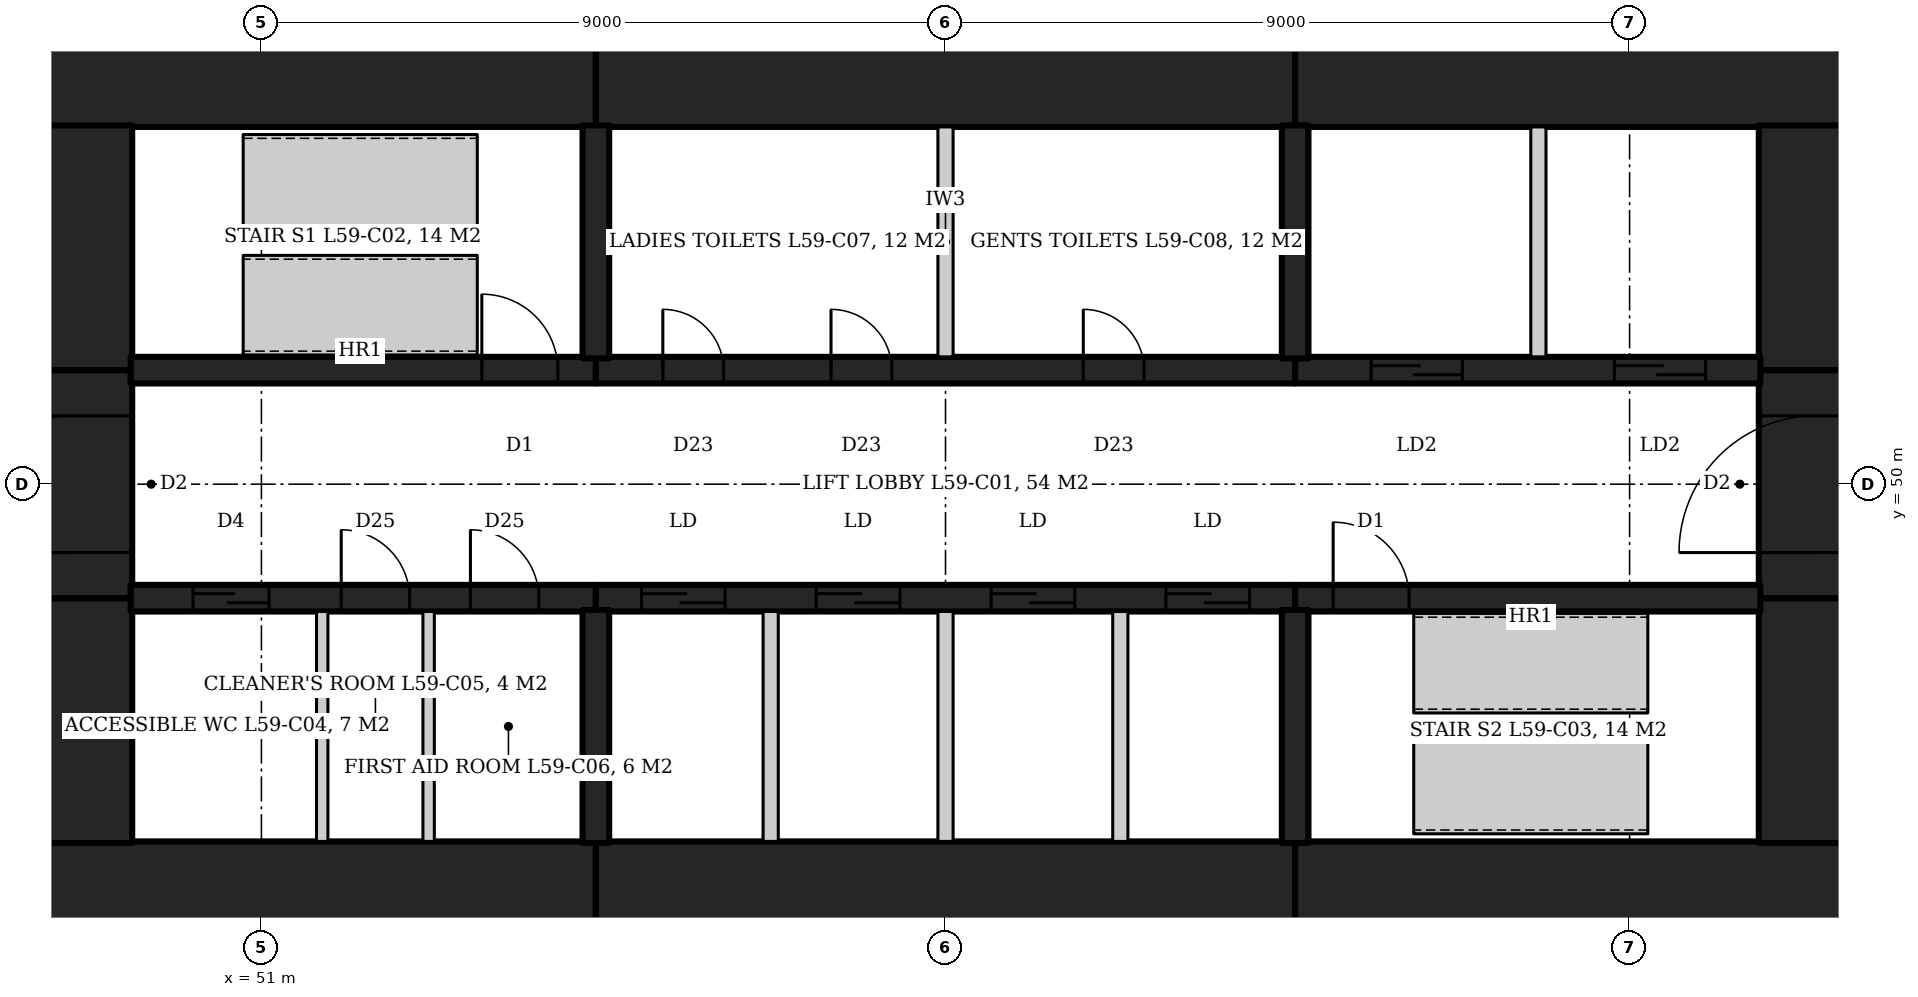
"""IFC4 building model, lengths in metres.
Left out: names, types, materials, properties, quantities, classifications, styles, units other than length and angle.
Written with IfcOpenShell. Run it as: python <this file> out.ifc"""

import sys

from ifc_helpers import new_model, si_unit, direction, frame, frame_2d, origin, place, context, subcontext, project, spatial, rectangle, extrude, element, fill, save


model = new_model("IFC4")
c1 = context("Model", 3, precision=1e-05, world=origin(), true_north=direction((0.0, 1.0)))
c2 = subcontext(c1, "Body", "Model", "MODEL_VIEW")
j1 = project(units=[si_unit("LENGTHUNIT", "METRE"), si_unit("PLANEANGLEUNIT", "RADIAN")], contexts=[c1])
p1 = place(None, origin())
s1 = spatial("IfcSite", under=j1, at=p1, CompositionType="ELEMENT")
p2 = place(p1, origin())
s2 = spatial("IfcBuilding", under=s1, at=p2, CompositionType="ELEMENT")
p3 = place(p2, frame((0.0, 0.0, 252.8)))
s3 = spatial("IfcBuildingStorey", under=s2, at=p3, CompositionType="ELEMENT", Elevation=252.8)
p4 = place(p3, frame((47.8, 55.45, 0.0), z_axis=(0.0, 0.0, 1.0), x_axis=(1.0, 0.0, 0.0)))
e1 = element("IfcWall", 1, at=p4, inside=s3, PredefinedType="SHEAR", context=c2, shape_type="SweptSolid", body=[
    extrude(rectangle(XDim=7.6, YDim=1.5, at=frame_2d((3.8, 0.0))), origin(), (0.0, 0.0, 1.0), 4.2),
])
p5 = place(p3, frame((55.4, 55.45, 0.0), z_axis=(0.0, 0.0, 1.0), x_axis=(1.0, 0.0, 0.0)))
e2 = element("IfcWall", 2, at=p5, inside=s3, PredefinedType="SHEAR", context=c2, shape_type="SweptSolid", body=[
    extrude(rectangle(XDim=9.2, YDim=1.5, at=frame_2d((4.6, 0.0))), origin(), (0.0, 0.0, 1.0), 4.2),
])
for number, where, z_axis, x_axis in (
    (3, (64.6, 55.45, 0.0), (0.0, 0.0, 1.0), (1.0, 0.0, 0.0)),
    (4, (47.8, 44.55, 0.0), (0.0, 0.0, 1.0), (1.0, 0.0, 0.0)),
):
    element("IfcWall", number, at=place(p3, frame(where, z_axis=z_axis, x_axis=x_axis)), inside=s3, PredefinedType="SHEAR", context=c2, shape_type="SweptSolid", body=[
        extrude(rectangle(XDim=7.6, YDim=1.5, at=frame_2d((3.8, 0.0))), origin(), (0.0, 0.0, 1.0), 4.2),
    ])
p6 = place(p3, frame((55.4, 44.55, 0.0), z_axis=(0.0, 0.0, 1.0), x_axis=(1.0, 0.0, 0.0)))
e5 = element("IfcWall", 5, at=p6, inside=s3, PredefinedType="SHEAR", context=c2, shape_type="SweptSolid", body=[
    extrude(rectangle(XDim=9.2, YDim=1.5, at=frame_2d((4.6, 0.0))), origin(), (0.0, 0.0, 1.0), 4.2),
])
p7 = place(p3, frame((64.6, 44.55, 0.0), z_axis=(0.0, 0.0, 1.0), x_axis=(1.0, 0.0, 0.0)))
e6 = element("IfcWall", 6, at=p7, inside=s3, PredefinedType="SHEAR", context=c2, shape_type="SweptSolid", body=[
    extrude(rectangle(XDim=7.6, YDim=1.5, at=frame_2d((3.8, 0.0))), origin(), (0.0, 0.0, 1.0), 4.2),
])
p8 = place(p3, frame((71.45, 45.28, 0.0), z_axis=(0.0, 0.0, 1.0), x_axis=(0.0, 1.0, 0.0)))
e7 = element("IfcWall", 7, at=p8, inside=s3, PredefinedType="SHEAR", context=c2, shape_type="SweptSolid", body=[
    extrude(rectangle(XDim=3.22, YDim=1.5, at=frame_2d((1.61, 0.0))), origin(), (0.0, 0.0, 1.0), 4.2),
])
p9 = place(p3, frame((71.45, 48.5, 0.0), z_axis=(0.0, 0.0, 1.0), x_axis=(0.0, 1.0, 0.0)))
e8 = element("IfcWall", 8, at=p9, inside=s3, PredefinedType="SHEAR", context=c2, shape_type="SweptSolid", body=[
    extrude(rectangle(XDim=3.0, YDim=1.5, at=frame_2d((1.5, 0.0))), origin(), (0.0, 0.0, 1.0), 4.2),
])
p10 = place(p9, frame((0.6, 0.0, 0.0)))
e9 = element("IfcOpeningElement", 9, at=p10, cuts=e8, PredefinedType="OPENING", context=c2, shape_type="SweptSolid", body=[
    extrude(rectangle(XDim=1.8, YDim=2.1, at=frame_2d((0.9, 1.05))), frame((0.0, 0.76, 0.0), z_axis=(0.0, -1.0, 0.0), x_axis=(1.0, 0.0, 0.0)), (0.0, 0.0, 1.0), 1.52),
])
for number, where, z_axis, x_axis in (
    (10, (71.45, 51.5, 0.0), (0.0, 0.0, 1.0), (0.0, 1.0, 0.0)),
    (11, (48.55, 45.28, 0.0), (0.0, 0.0, 1.0), (0.0, 1.0, 0.0)),
):
    element("IfcWall", number, at=place(p3, frame(where, z_axis=z_axis, x_axis=x_axis)), inside=s3, PredefinedType="SHEAR", context=c2, shape_type="SweptSolid", body=[
        extrude(rectangle(XDim=3.22, YDim=1.5, at=frame_2d((1.61, 0.0))), origin(), (0.0, 0.0, 1.0), 4.2),
    ])
p11 = place(p3, frame((48.55, 48.5, 0.0), z_axis=(0.0, 0.0, 1.0), x_axis=(0.0, 1.0, 0.0)))
e12 = element("IfcWall", 12, at=p11, inside=s3, PredefinedType="SHEAR", context=c2, shape_type="SweptSolid", body=[
    extrude(rectangle(XDim=3.0, YDim=1.5, at=frame_2d((1.5, 0.0))), origin(), (0.0, 0.0, 1.0), 4.2),
])
p12 = place(p11, frame((0.6, 0.0, 0.0)))
e13 = element("IfcOpeningElement", 13, at=p12, cuts=e12, PredefinedType="OPENING", context=c2, shape_type="SweptSolid", body=[
    extrude(rectangle(XDim=1.8, YDim=2.1, at=frame_2d((0.9, 1.05))), frame((0.0, 0.76, 0.0), z_axis=(0.0, -1.0, 0.0), x_axis=(1.0, 0.0, 0.0)), (0.0, 0.0, 1.0), 1.52),
])
p13 = place(p3, frame((48.55, 51.5, 0.0), z_axis=(0.0, 0.0, 1.0), x_axis=(0.0, 1.0, 0.0)))
e14 = element("IfcWall", 14, at=p13, inside=s3, PredefinedType="SHEAR", context=c2, shape_type="SweptSolid", body=[
    extrude(rectangle(XDim=3.22, YDim=1.5, at=frame_2d((1.61, 0.0))), origin(), (0.0, 0.0, 1.0), 4.2),
])
p14 = place(p3, frame((49.28, 51.5, 0.0), z_axis=(0.0, 0.0, 1.0), x_axis=(1.0, 0.0, 0.0)))
e15 = element("IfcWall", 15, at=p14, inside=s3, PredefinedType="SHEAR", context=c2, shape_type="SweptSolid", body=[
    extrude(rectangle(XDim=6.12, YDim=0.35, at=frame_2d((3.06, 0.0))), origin(), (0.0, 0.0, 1.0), 4.2),
])
p15 = place(p14, frame((4.62, 0.0, 0.0)))
e16 = element("IfcOpeningElement", 16, at=p15, cuts=e15, PredefinedType="OPENING", context=c2, shape_type="SweptSolid", body=[
    extrude(rectangle(XDim=1.0, YDim=2.1, at=frame_2d((0.5, 1.05))), frame((0.0, 0.185, 0.0), z_axis=(0.0, -1.0, 0.0), x_axis=(1.0, 0.0, 0.0)), (0.0, 0.0, 1.0), 0.37),
])
p16 = place(p3, frame((55.4, 51.5, 0.0), z_axis=(0.0, 0.0, 1.0), x_axis=(1.0, 0.0, 0.0)))
e17 = element("IfcWall", 17, at=p16, inside=s3, PredefinedType="SHEAR", context=c2, shape_type="SweptSolid", body=[
    extrude(rectangle(XDim=9.2, YDim=0.35, at=frame_2d((4.6, 0.0))), origin(), (0.0, 0.0, 1.0), 4.2),
])
p17 = place(p16, frame((0.881, 0.0, 0.0)))
e18 = element("IfcOpeningElement", 18, at=p17, cuts=e17, PredefinedType="OPENING", context=c2, shape_type="SweptSolid", body=[
    extrude(rectangle(XDim=0.8, YDim=2.1, at=frame_2d((0.4, 1.05))), frame((0.0, 0.185, 0.0), z_axis=(0.0, -1.0, 0.0), x_axis=(1.0, 0.0, 0.0)), (0.0, 0.0, 1.0), 0.37),
])
p18 = place(p16, frame((3.094, 0.0, 0.0)))
e19 = element("IfcOpeningElement", 19, at=p18, cuts=e17, PredefinedType="OPENING", context=c2, shape_type="SweptSolid", body=[
    extrude(rectangle(XDim=0.8, YDim=2.1, at=frame_2d((0.4, 1.05))), frame((0.0, 0.185, 0.0), z_axis=(0.0, -1.0, 0.0), x_axis=(1.0, 0.0, 0.0)), (0.0, 0.0, 1.0), 0.37),
])
p19 = place(p16, frame((6.413, 0.0, 0.0)))
e20 = element("IfcOpeningElement", 20, at=p19, cuts=e17, PredefinedType="OPENING", context=c2, shape_type="SweptSolid", body=[
    extrude(rectangle(XDim=0.8, YDim=2.1, at=frame_2d((0.4, 1.05))), frame((0.0, 0.185, 0.0), z_axis=(0.0, -1.0, 0.0), x_axis=(1.0, 0.0, 0.0)), (0.0, 0.0, 1.0), 0.37),
])
p20 = place(p3, frame((64.6, 51.5, 0.0), z_axis=(0.0, 0.0, 1.0), x_axis=(1.0, 0.0, 0.0)))
e21 = element("IfcWall", 21, at=p20, inside=s3, PredefinedType="SHEAR", context=c2, shape_type="SweptSolid", body=[
    extrude(rectangle(XDim=6.12, YDim=0.35, at=frame_2d((3.06, 0.0))), origin(), (0.0, 0.0, 1.0), 4.2),
])
p21 = place(p20, frame((1.0, 0.0, 0.0)))
e22 = element("IfcOpeningElement", 22, at=p21, cuts=e21, PredefinedType="OPENING", context=c2, shape_type="SweptSolid", body=[
    extrude(rectangle(XDim=1.2, YDim=2.1, at=frame_2d((0.6, 1.05))), frame((0.0, 0.185, 0.0), z_axis=(0.0, -1.0, 0.0), x_axis=(1.0, 0.0, 0.0)), (0.0, 0.0, 1.0), 0.37),
])
p22 = place(p20, frame((4.2, 0.0, 0.0)))
e23 = element("IfcOpeningElement", 23, at=p22, cuts=e21, PredefinedType="OPENING", context=c2, shape_type="SweptSolid", body=[
    extrude(rectangle(XDim=1.2, YDim=2.1, at=frame_2d((0.6, 1.05))), frame((0.0, 0.185, 0.0), z_axis=(0.0, -1.0, 0.0), x_axis=(1.0, 0.0, 0.0)), (0.0, 0.0, 1.0), 0.37),
])
p23 = place(p3, frame((49.28, 48.5, 0.0), z_axis=(0.0, 0.0, 1.0), x_axis=(1.0, 0.0, 0.0)))
e24 = element("IfcWall", 24, at=p23, inside=s3, PredefinedType="SHEAR", context=c2, shape_type="SweptSolid", body=[
    extrude(rectangle(XDim=6.12, YDim=0.35, at=frame_2d((3.06, 0.0))), origin(), (0.0, 0.0, 1.0), 4.2),
])
p24 = place(p23, frame((0.82, 0.0, 0.0)))
e25 = element("IfcOpeningElement", 25, at=p24, cuts=e24, PredefinedType="OPENING", context=c2, shape_type="SweptSolid", body=[
    extrude(rectangle(XDim=1.0, YDim=2.1, at=frame_2d((0.5, 1.05))), frame((0.0, 0.185, 0.0), z_axis=(0.0, -1.0, 0.0), x_axis=(1.0, 0.0, 0.0)), (0.0, 0.0, 1.0), 0.37),
])
p25 = place(p23, frame((2.77, 0.0, 0.0)))
e26 = element("IfcOpeningElement", 26, at=p25, cuts=e24, PredefinedType="OPENING", context=c2, shape_type="SweptSolid", body=[
    extrude(rectangle(XDim=0.9, YDim=2.1, at=frame_2d((0.45, 1.05))), frame((0.0, 0.185, 0.0), z_axis=(0.0, -1.0, 0.0), x_axis=(1.0, 0.0, 0.0)), (0.0, 0.0, 1.0), 0.37),
])
p26 = place(p23, frame((4.47, 0.0, 0.0)))
e27 = element("IfcOpeningElement", 27, at=p26, cuts=e24, PredefinedType="OPENING", context=c2, shape_type="SweptSolid", body=[
    extrude(rectangle(XDim=0.9, YDim=2.1, at=frame_2d((0.45, 1.05))), frame((0.0, 0.185, 0.0), z_axis=(0.0, -1.0, 0.0), x_axis=(1.0, 0.0, 0.0)), (0.0, 0.0, 1.0), 0.37),
])
p27 = place(p3, frame((55.4, 48.5, 0.0), z_axis=(0.0, 0.0, 1.0), x_axis=(1.0, 0.0, 0.0)))
e28 = element("IfcWall", 28, at=p27, inside=s3, PredefinedType="SHEAR", context=c2, shape_type="SweptSolid", body=[
    extrude(rectangle(XDim=9.2, YDim=0.35, at=frame_2d((4.6, 0.0))), origin(), (0.0, 0.0, 1.0), 4.2),
])
p28 = place(p27, frame((0.6, 0.0, 0.0)))
e29 = element("IfcOpeningElement", 29, at=p28, cuts=e28, PredefinedType="OPENING", context=c2, shape_type="SweptSolid", body=[
    extrude(rectangle(XDim=1.1, YDim=2.1, at=frame_2d((0.55, 1.05))), frame((0.0, 0.185, 0.0), z_axis=(0.0, -1.0, 0.0), x_axis=(1.0, 0.0, 0.0)), (0.0, 0.0, 1.0), 0.37),
])
p29 = place(p27, frame((2.9, 0.0, 0.0)))
e30 = element("IfcOpeningElement", 30, at=p29, cuts=e28, PredefinedType="OPENING", context=c2, shape_type="SweptSolid", body=[
    extrude(rectangle(XDim=1.1, YDim=2.1, at=frame_2d((0.55, 1.05))), frame((0.0, 0.185, 0.0), z_axis=(0.0, -1.0, 0.0), x_axis=(1.0, 0.0, 0.0)), (0.0, 0.0, 1.0), 0.37),
])
p30 = place(p27, frame((5.2, 0.0, 0.0)))
e31 = element("IfcOpeningElement", 31, at=p30, cuts=e28, PredefinedType="OPENING", context=c2, shape_type="SweptSolid", body=[
    extrude(rectangle(XDim=1.1, YDim=2.1, at=frame_2d((0.55, 1.05))), frame((0.0, 0.185, 0.0), z_axis=(0.0, -1.0, 0.0), x_axis=(1.0, 0.0, 0.0)), (0.0, 0.0, 1.0), 0.37),
])
p31 = place(p27, frame((7.5, 0.0, 0.0)))
e32 = element("IfcOpeningElement", 32, at=p31, cuts=e28, PredefinedType="OPENING", context=c2, shape_type="SweptSolid", body=[
    extrude(rectangle(XDim=1.1, YDim=2.1, at=frame_2d((0.55, 1.05))), frame((0.0, 0.185, 0.0), z_axis=(0.0, -1.0, 0.0), x_axis=(1.0, 0.0, 0.0)), (0.0, 0.0, 1.0), 0.37),
])
p32 = place(p3, frame((64.6, 48.5, 0.0), z_axis=(0.0, 0.0, 1.0), x_axis=(1.0, 0.0, 0.0)))
e33 = element("IfcWall", 33, at=p32, inside=s3, PredefinedType="SHEAR", context=c2, shape_type="SweptSolid", body=[
    extrude(rectangle(XDim=6.12, YDim=0.35, at=frame_2d((3.06, 0.0))), origin(), (0.0, 0.0, 1.0), 4.2),
])
p33 = place(p32, frame((0.5, 0.0, 0.0)))
e34 = element("IfcOpeningElement", 34, at=p33, cuts=e33, PredefinedType="OPENING", context=c2, shape_type="SweptSolid", body=[
    extrude(rectangle(XDim=1.0, YDim=2.1, at=frame_2d((0.5, 1.05))), frame((0.0, 0.185, 0.0), z_axis=(0.0, -1.0, 0.0), x_axis=(1.0, 0.0, 0.0)), (0.0, 0.0, 1.0), 0.37),
])
for number, where, z_axis, x_axis in (
    (35, (55.4, 51.655, 0.0), (0.0, 0.0, 1.0), (0.0, 1.0, 0.0)),
    (36, (64.6, 51.655, 0.0), (0.0, 0.0, 1.0), (0.0, 1.0, 0.0)),
    (37, (55.4, 48.345, 0.0), (0.0, 0.0, 1.0), (0.0, -1.0, 0.0)),
    (38, (64.6, 48.345, 0.0), (0.0, 0.0, 1.0), (0.0, -1.0, 0.0)),
):
    element("IfcWall", number, at=place(p3, frame(where, z_axis=z_axis, x_axis=x_axis)), inside=s3, PredefinedType="SHEAR", context=c2, shape_type="SweptSolid", body=[
        extrude(rectangle(XDim=3.065, YDim=0.35, at=frame_2d((1.532, 0.0))), origin(), (0.0, 0.0, 1.0), 4.2),
    ])
for number, where, z_axis, x_axis in (
    (39, (57.7, 45.3, 0.0), (0.0, 0.0, 1.0), (0.0, 1.0, 0.0)),
    (40, (60.0, 45.3, 0.0), (0.0, 0.0, 1.0), (0.0, 1.0, 0.0)),
    (41, (62.3, 45.3, 0.0), (0.0, 0.0, 1.0), (0.0, 1.0, 0.0)),
    (42, (67.8, 51.675, 0.0), (0.0, 0.0, 1.0), (0.0, 1.0, 0.0)),
):
    element("IfcWall", number, at=place(p3, frame(where, z_axis=z_axis, x_axis=x_axis)), inside=s3, PredefinedType="PARTITIONING", context=c2, shape_type="SweptSolid", body=[
        extrude(rectangle(XDim=3.025, YDim=0.2, at=frame_2d((1.512, 0.0))), origin(), (0.0, 0.0, 1.0), 4.2),
    ])
for number, where, z_axis, x_axis in (
    (43, (51.8, 45.3, 0.0), (0.0, 0.0, 1.0), (0.0, 1.0, 0.0)),
    (44, (53.2, 45.3, 0.0), (0.0, 0.0, 1.0), (0.0, 1.0, 0.0)),
):
    element("IfcWall", number, at=place(p3, frame(where, z_axis=z_axis, x_axis=x_axis)), inside=s3, PredefinedType="PARTITIONING", context=c2, shape_type="SweptSolid", body=[
        extrude(rectangle(XDim=3.025, YDim=0.15, at=frame_2d((1.512, 0.0))), origin(), (0.0, 0.0, 1.0), 4.04),
    ])
p34 = place(p3, frame((60.0, 51.675, 0.0), z_axis=(0.0, 0.0, 1.0), x_axis=(0.0, 1.0, 0.0)))
e45 = element("IfcWall", 45, at=p34, inside=s3, PredefinedType="PARTITIONING", context=c2, shape_type="SweptSolid", body=[
    extrude(rectangle(XDim=3.025, YDim=0.2, at=frame_2d((1.512, 0.0))), origin(), (0.0, 0.0, 1.0), 4.04),
])
p35 = place(p15, origin())
e46 = element("IfcDoor", 46, at=p35, inside=s3, OperationType="SINGLE_SWING_LEFT", PredefinedType="DOOR", context=c2, shape_type="SweptSolid", body=[
    extrude(rectangle(XDim=1.0, YDim=2.1, at=frame_2d((0.5, 1.05))), frame((0.0, 0.025, 0.0), z_axis=(0.0, -1.0, 0.0), x_axis=(1.0, 0.0, 0.0)), (0.0, 0.0, 1.0), 0.05),
])
fill(e16, e46)
p36 = place(p33, origin())
e47 = element("IfcDoor", 47, at=p36, inside=s3, OperationType="SINGLE_SWING_LEFT", PredefinedType="DOOR", context=c2, shape_type="SweptSolid", body=[
    extrude(rectangle(XDim=1.0, YDim=2.1, at=frame_2d((0.5, 1.05))), frame((0.0, 0.025, 0.0), z_axis=(0.0, -1.0, 0.0), x_axis=(1.0, 0.0, 0.0)), (0.0, 0.0, 1.0), 0.05),
])
fill(e34, e47)
p37 = place(p21, origin())
e48 = element("IfcDoor", 48, at=p37, inside=s3, OperationType="SLIDING_TO_LEFT", PredefinedType="DOOR", context=c2, shape_type="SweptSolid", body=[
    extrude(rectangle(XDim=1.2, YDim=2.1, at=frame_2d((0.6, 1.05))), frame((0.0, 0.025, 0.0), z_axis=(0.0, -1.0, 0.0), x_axis=(1.0, 0.0, 0.0)), (0.0, 0.0, 1.0), 0.05),
])
fill(e22, e48)
p38 = place(p22, origin())
e49 = element("IfcDoor", 49, at=p38, inside=s3, OperationType="SLIDING_TO_LEFT", PredefinedType="DOOR", context=c2, shape_type="SweptSolid", body=[
    extrude(rectangle(XDim=1.2, YDim=2.1, at=frame_2d((0.6, 1.05))), frame((0.0, 0.025, 0.0), z_axis=(0.0, -1.0, 0.0), x_axis=(1.0, 0.0, 0.0)), (0.0, 0.0, 1.0), 0.05),
])
fill(e23, e49)
p39 = place(p28, origin())
e50 = element("IfcDoor", 50, at=p39, inside=s3, OperationType="SLIDING_TO_LEFT", PredefinedType="DOOR", context=c2, shape_type="SweptSolid", body=[
    extrude(rectangle(XDim=1.1, YDim=2.1, at=frame_2d((0.55, 1.05))), frame((0.0, 0.025, 0.0), z_axis=(0.0, -1.0, 0.0), x_axis=(1.0, 0.0, 0.0)), (0.0, 0.0, 1.0), 0.05),
])
fill(e29, e50)
p40 = place(p29, origin())
e51 = element("IfcDoor", 51, at=p40, inside=s3, OperationType="SLIDING_TO_LEFT", PredefinedType="DOOR", context=c2, shape_type="SweptSolid", body=[
    extrude(rectangle(XDim=1.1, YDim=2.1, at=frame_2d((0.55, 1.05))), frame((0.0, 0.025, 0.0), z_axis=(0.0, -1.0, 0.0), x_axis=(1.0, 0.0, 0.0)), (0.0, 0.0, 1.0), 0.05),
])
fill(e30, e51)
p41 = place(p30, origin())
e52 = element("IfcDoor", 52, at=p41, inside=s3, OperationType="SLIDING_TO_LEFT", PredefinedType="DOOR", context=c2, shape_type="SweptSolid", body=[
    extrude(rectangle(XDim=1.1, YDim=2.1, at=frame_2d((0.55, 1.05))), frame((0.0, 0.025, 0.0), z_axis=(0.0, -1.0, 0.0), x_axis=(1.0, 0.0, 0.0)), (0.0, 0.0, 1.0), 0.05),
])
fill(e31, e52)
p42 = place(p31, origin())
e53 = element("IfcDoor", 53, at=p42, inside=s3, OperationType="SLIDING_TO_LEFT", PredefinedType="DOOR", context=c2, shape_type="SweptSolid", body=[
    extrude(rectangle(XDim=1.1, YDim=2.1, at=frame_2d((0.55, 1.05))), frame((0.0, 0.025, 0.0), z_axis=(0.0, -1.0, 0.0), x_axis=(1.0, 0.0, 0.0)), (0.0, 0.0, 1.0), 0.05),
])
fill(e32, e53)
p43 = place(p24, origin())
e54 = element("IfcDoor", 54, at=p43, inside=s3, OperationType="SLIDING_TO_LEFT", PredefinedType="DOOR", context=c2, shape_type="SweptSolid", body=[
    extrude(rectangle(XDim=1.0, YDim=2.1, at=frame_2d((0.5, 1.05))), frame((0.0, 0.025, 0.0), z_axis=(0.0, -1.0, 0.0), x_axis=(1.0, 0.0, 0.0)), (0.0, 0.0, 1.0), 0.05),
])
fill(e25, e54)
p44 = place(p25, origin())
e55 = element("IfcDoor", 55, at=p44, inside=s3, OperationType="SINGLE_SWING_RIGHT", PredefinedType="DOOR", context=c2, shape_type="SweptSolid", body=[
    extrude(rectangle(XDim=0.9, YDim=2.1, at=frame_2d((0.45, 1.05))), frame((0.0, 0.025, 0.0), z_axis=(0.0, -1.0, 0.0), x_axis=(1.0, 0.0, 0.0)), (0.0, 0.0, 1.0), 0.05),
])
fill(e26, e55)
p45 = place(p26, origin())
e56 = element("IfcDoor", 56, at=p45, inside=s3, OperationType="SINGLE_SWING_RIGHT", PredefinedType="DOOR", context=c2, shape_type="SweptSolid", body=[
    extrude(rectangle(XDim=0.9, YDim=2.1, at=frame_2d((0.45, 1.05))), frame((0.0, 0.025, 0.0), z_axis=(0.0, -1.0, 0.0), x_axis=(1.0, 0.0, 0.0)), (0.0, 0.0, 1.0), 0.05),
])
fill(e27, e56)
p46 = place(p10, origin())
e57 = element("IfcDoor", 57, at=p46, inside=s3, OperationType="DOUBLE_DOOR_DOUBLE_SWING", PredefinedType="DOOR", context=c2, shape_type="SweptSolid", body=[
    extrude(rectangle(XDim=1.8, YDim=2.1, at=frame_2d((0.9, 1.05))), frame((0.0, 0.025, 0.0), z_axis=(0.0, -1.0, 0.0), x_axis=(1.0, 0.0, 0.0)), (0.0, 0.0, 1.0), 0.05),
])
fill(e9, e57)
p47 = place(p12, origin())
e58 = element("IfcDoor", 58, at=p47, inside=s3, OperationType="DOUBLE_DOOR_DOUBLE_SWING", PredefinedType="DOOR", context=c2, shape_type="SweptSolid", body=[
    extrude(rectangle(XDim=1.8, YDim=2.1, at=frame_2d((0.9, 1.05))), frame((0.0, 0.025, 0.0), z_axis=(0.0, -1.0, 0.0), x_axis=(1.0, 0.0, 0.0)), (0.0, 0.0, 1.0), 0.05),
])
fill(e13, e58)
p48 = place(p17, origin())
e59 = element("IfcDoor", 59, at=p48, inside=s3, OperationType="SINGLE_SWING_LEFT", PredefinedType="DOOR", context=c2, shape_type="SweptSolid", body=[
    extrude(rectangle(XDim=0.8, YDim=2.1, at=frame_2d((0.4, 1.05))), frame((0.0, 0.025, 0.0), z_axis=(0.0, -1.0, 0.0), x_axis=(1.0, 0.0, 0.0)), (0.0, 0.0, 1.0), 0.05),
])
fill(e18, e59)
p49 = place(p18, origin())
e60 = element("IfcDoor", 60, at=p49, inside=s3, OperationType="SINGLE_SWING_LEFT", PredefinedType="DOOR", context=c2, shape_type="SweptSolid", body=[
    extrude(rectangle(XDim=0.8, YDim=2.1, at=frame_2d((0.4, 1.05))), frame((0.0, 0.025, 0.0), z_axis=(0.0, -1.0, 0.0), x_axis=(1.0, 0.0, 0.0)), (0.0, 0.0, 1.0), 0.05),
])
fill(e19, e60)
p50 = place(p19, origin())
e61 = element("IfcDoor", 61, at=p50, inside=s3, OperationType="SINGLE_SWING_LEFT", PredefinedType="DOOR", context=c2, shape_type="SweptSolid", body=[
    extrude(rectangle(XDim=0.8, YDim=2.1, at=frame_2d((0.4, 1.05))), frame((0.0, 0.025, 0.0), z_axis=(0.0, -1.0, 0.0), x_axis=(1.0, 0.0, 0.0)), (0.0, 0.0, 1.0), 0.05),
])
fill(e20, e61)
save(model, sys.argv[1])
